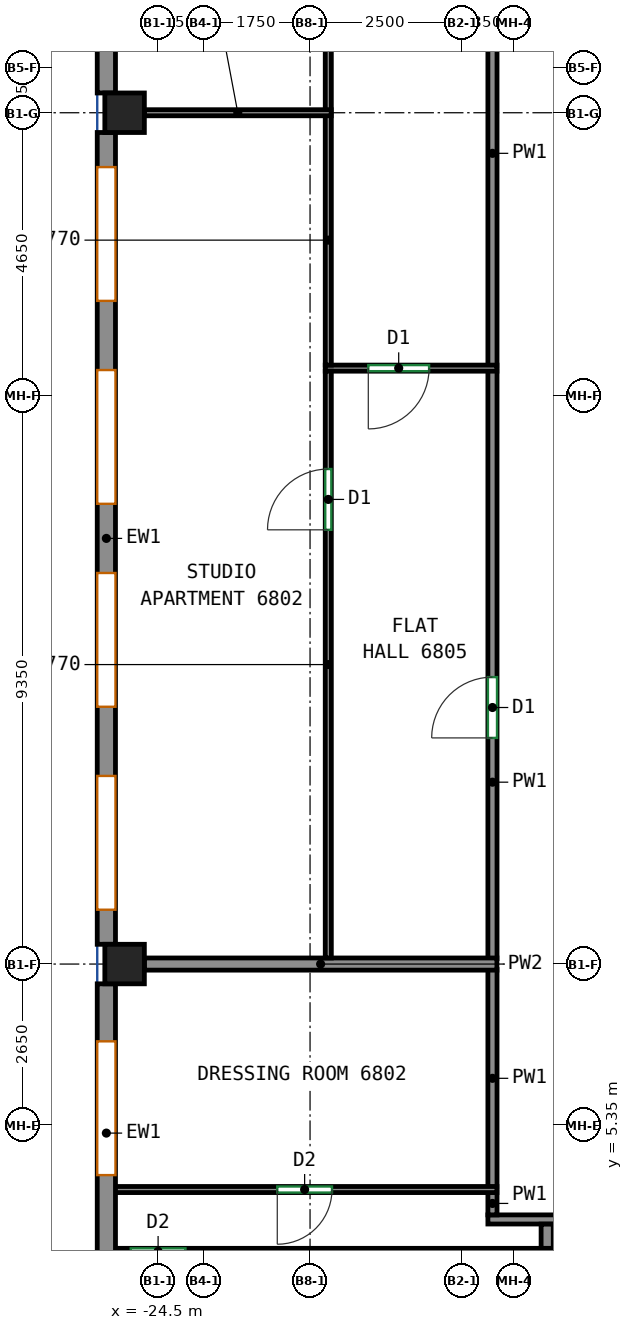
"""IFC4 building model, lengths in metres.
Left out: names, types, materials, properties, quantities, classifications, styles, units other than length and angle.
Written with IfcOpenShell. Run it as: python <this file> out.ifc"""

import sys

from ifc_helpers import new_model, si_unit, direction, frame, frame_2d, origin, origin_2d, place, context, subcontext, project, spatial, rectangle, extrude, source, transform, mapped, element, fill, save


model = new_model("IFC4")
c1 = context("Model", 3, precision=1e-05, world=origin(), true_north=direction((0.0, 1.0)))
c2 = subcontext(c1, "Body", "Model", "MODEL_VIEW")
j1 = project(units=[si_unit("LENGTHUNIT", "METRE"), si_unit("PLANEANGLEUNIT", "RADIAN")], contexts=[c1])
p1 = place(None, origin())
s1 = spatial("IfcSite", under=j1, at=p1, CompositionType="ELEMENT")
p2 = place(p1, origin())
s2 = spatial("IfcBuilding", under=s1, at=p2, CompositionType="ELEMENT")
p3 = place(p2, frame((0.0, 0.0, 277.2)))
s3 = spatial("IfcBuildingStorey", under=s2, at=p3, CompositionType="ELEMENT", Elevation=277.2)
m1 = source(origin(), c2, "Body", "SweptSolid", [
    extrude(rectangle(XDim=0.65, YDim=0.65, at=origin_2d()), origin(), (0.0, 0.0, 1.0), 3.12),
])
for number, where, z_axis, x_axis in (
    (1, (-25.05, 8.0, 0.0), (0.0, 0.0, 1.0), (1.0, 0.0, 0.0)),
    (2, (-25.05, 22.0, 0.0), (0.0, 0.0, 1.0), (1.0, 0.0, 0.0)),
):
    element("IfcColumn", number, at=place(p3, frame(where, z_axis=z_axis, x_axis=x_axis)), inside=s3, PredefinedType="COLUMN", context=c2, shape_type="MappedRepresentation", body=[
        mapped(m1, transform((0.0, 0.0, 0.0))),
    ])
m2 = source(origin(), c2, "Body", "SweptSolid", [
    extrude(rectangle(XDim=4.032, YDim=0.3, at=frame_2d((2.016, 0.0))), origin(), (0.0, 0.0, 1.0), 3.12),
])
p4 = place(p3, frame((-25.35, 26.357, 0.0), z_axis=(0.0, 0.0, 1.0), x_axis=(0.0, -1.0, 0.0)))
e3 = element("IfcWall", 3, at=p4, inside=s3, PredefinedType="SOLIDWALL", context=c2, shape_type="MappedRepresentation", body=[
    mapped(m2, transform((0.0, 0.0, 0.0))),
])
p5 = place(p4, frame((0.916, 0.0, 0.8)))
e4 = element("IfcOpeningElement", 4, at=p5, cuts=e3, PredefinedType="OPENING", context=c2, shape_type="SweptSolid", body=[
    extrude(rectangle(XDim=2.2, YDim=2.05, at=frame_2d((1.1, 1.025))), frame((0.0, 0.16, 0.0), z_axis=(0.0, -1.0, 0.0), x_axis=(1.0, 0.0, 0.0)), (0.0, 0.0, 1.0), 0.32),
])
m3 = source(origin(), c2, "Body", "SweptSolid", [
    extrude(rectangle(XDim=13.35, YDim=0.3, at=frame_2d((6.675, 0.0))), origin(), (0.0, 0.0, 1.0), 3.12),
])
p6 = place(p3, frame((-25.35, 21.675, 0.0), z_axis=(0.0, 0.0, 1.0), x_axis=(0.0, -1.0, 0.0)))
e5 = element("IfcWall", 5, at=p6, inside=s3, PredefinedType="SOLIDWALL", context=c2, shape_type="MappedRepresentation", body=[
    mapped(m3, transform((0.0, 0.0, 0.0))),
])
p7 = place(p6, frame((0.569, 0.0, 0.8)))
e6 = element("IfcOpeningElement", 6, at=p7, cuts=e5, PredefinedType="OPENING", context=c2, shape_type="SweptSolid", body=[
    extrude(rectangle(XDim=2.2, YDim=2.05, at=frame_2d((1.1, 1.025))), frame((0.0, 0.16, 0.0), z_axis=(0.0, -1.0, 0.0), x_axis=(1.0, 0.0, 0.0)), (0.0, 0.0, 1.0), 0.32),
])
p8 = place(p6, frame((3.906, 0.0, 0.8)))
e7 = element("IfcOpeningElement", 7, at=p8, cuts=e5, PredefinedType="OPENING", context=c2, shape_type="SweptSolid", body=[
    extrude(rectangle(XDim=2.2, YDim=2.05, at=frame_2d((1.1, 1.025))), frame((0.0, 0.16, 0.0), z_axis=(0.0, -1.0, 0.0), x_axis=(1.0, 0.0, 0.0)), (0.0, 0.0, 1.0), 0.32),
])
p9 = place(p6, frame((7.244, 0.0, 0.8)))
e8 = element("IfcOpeningElement", 8, at=p9, cuts=e5, PredefinedType="OPENING", context=c2, shape_type="SweptSolid", body=[
    extrude(rectangle(XDim=2.2, YDim=2.05, at=frame_2d((1.1, 1.025))), frame((0.0, 0.16, 0.0), z_axis=(0.0, -1.0, 0.0), x_axis=(1.0, 0.0, 0.0)), (0.0, 0.0, 1.0), 0.32),
])
p10 = place(p6, frame((10.581, 0.0, 0.8)))
e9 = element("IfcOpeningElement", 9, at=p10, cuts=e5, PredefinedType="OPENING", context=c2, shape_type="SweptSolid", body=[
    extrude(rectangle(XDim=2.2, YDim=2.05, at=frame_2d((1.1, 1.025))), frame((0.0, 0.16, 0.0), z_axis=(0.0, -1.0, 0.0), x_axis=(1.0, 0.0, 0.0)), (0.0, 0.0, 1.0), 0.32),
])
m4 = source(origin(), c2, "Body", "SweptSolid", [
    extrude(rectangle(XDim=8.183, YDim=0.3, at=frame_2d((4.092, 0.0))), origin(), (0.0, 0.0, 1.0), 3.12),
])
p11 = place(p3, frame((-25.35, 7.675, 0.0), z_axis=(0.0, 0.0, 1.0), x_axis=(0.0, -1.0, 0.0)))
e10 = element("IfcWall", 10, at=p11, inside=s3, PredefinedType="SOLIDWALL", context=c2, shape_type="MappedRepresentation", body=[
    mapped(m4, transform((0.0, 0.0, 0.0))),
])
p12 = place(p11, frame((0.946, 0.0, 0.8)))
e11 = element("IfcOpeningElement", 11, at=p12, cuts=e10, PredefinedType="OPENING", context=c2, shape_type="SweptSolid", body=[
    extrude(rectangle(XDim=2.2, YDim=2.05, at=frame_2d((1.1, 1.025))), frame((0.0, 0.16, 0.0), z_axis=(0.0, -1.0, 0.0), x_axis=(1.0, 0.0, 0.0)), (0.0, 0.0, 1.0), 0.32),
])
p13 = place(p11, frame((5.037, 0.0, 0.8)))
e12 = element("IfcOpeningElement", 12, at=p13, cuts=e10, PredefinedType="OPENING", context=c2, shape_type="SweptSolid", body=[
    extrude(rectangle(XDim=2.2, YDim=2.05, at=frame_2d((1.1, 1.025))), frame((0.0, 0.16, 0.0), z_axis=(0.0, -1.0, 0.0), x_axis=(1.0, 0.0, 0.0)), (0.0, 0.0, 1.0), 0.32),
])
p14 = place(p3, frame((-19.075, 3.8, 0.0), z_axis=(0.0, 0.0, 1.0), x_axis=(1.0, 0.0, 0.0)))
e13 = element("IfcWall", 13, at=p14, inside=s3, PredefinedType="PARTITIONING", context=c2, shape_type="SweptSolid", body=[
    extrude(rectangle(XDim=4.89, YDim=0.15, at=frame_2d((2.445, 0.0))), origin(), (0.0, 0.0, 1.0), 3.12),
])
p15 = place(p3, frame((-19.0, 3.875, 0.0), z_axis=(0.0, 0.0, 1.0), x_axis=(0.0, 1.0, 0.0)))
e14 = element("IfcWall", 14, at=p15, inside=s3, PredefinedType="PARTITIONING", context=c2, shape_type="SweptSolid", body=[
    extrude(rectangle(XDim=0.377, YDim=0.15, at=frame_2d((0.188, 0.0))), origin(), (0.0, 0.0, 1.0), 3.12),
])
p16 = place(p3, frame((-19.0, 4.332, 0.0), z_axis=(0.0, 0.0, 1.0), x_axis=(0.0, 1.0, 0.0)))
e15 = element("IfcWall", 15, at=p16, inside=s3, PredefinedType="PARTITIONING", context=c2, shape_type="SweptSolid", body=[
    extrude(rectangle(XDim=3.578, YDim=0.15, at=frame_2d((1.789, 0.0))), origin(), (0.0, 0.0, 1.0), 3.12),
])
p17 = place(p3, frame((-19.0, 8.09, 0.0), z_axis=(0.0, 0.0, 1.0), x_axis=(0.0, 1.0, 0.0)))
e16 = element("IfcWall", 16, at=p17, inside=s3, PredefinedType="PARTITIONING", context=c2, shape_type="SweptSolid", body=[
    extrude(rectangle(XDim=9.67, YDim=0.15, at=frame_2d((4.835, 0.0))), origin(), (0.0, 0.0, 1.0), 3.12),
])
p18 = place(p17, frame((3.629, 0.0, 0.0)))
e17 = element("IfcOpeningElement", 17, at=p18, cuts=e16, PredefinedType="OPENING", context=c2, shape_type="SweptSolid", body=[
    extrude(rectangle(XDim=1.0, YDim=2.1, at=frame_2d((0.5, 1.05))), frame((0.0, 0.085, 0.0), z_axis=(0.0, -1.0, 0.0), x_axis=(1.0, 0.0, 0.0)), (0.0, 0.0, 1.0), 0.17),
])
p19 = place(p3, frame((-19.0, 17.84, 0.0), z_axis=(0.0, 0.0, 1.0), x_axis=(0.0, 1.0, 0.0)))
e18 = element("IfcWall", 18, at=p19, inside=s3, PredefinedType="PARTITIONING", context=c2, shape_type="SweptSolid", body=[
    extrude(rectangle(XDim=6.985, YDim=0.15, at=frame_2d((3.492, 0.0))), origin(), (0.0, 0.0, 1.0), 3.12),
])
p20 = place(p3, frame((-18.0, 3.275, 0.0), z_axis=(0.0, 0.0, 1.0), x_axis=(-1.0, 0.0, 0.0)))
e19 = element("IfcWall", 19, at=p20, inside=s3, PredefinedType="PARTITIONING", context=c2, shape_type="SweptSolid", body=[
    extrude(rectangle(XDim=7.25, YDim=0.1, at=frame_2d((3.625, 0.0))), origin(), (0.0, 0.0, 1.0), 3.12),
])
p21 = place(p20, frame((6.049, 0.0, 0.0)))
e20 = element("IfcOpeningElement", 20, at=p21, cuts=e19, PredefinedType="OPENING", context=c2, shape_type="SweptSolid", body=[
    extrude(rectangle(XDim=0.9, YDim=2.1, at=frame_2d((0.45, 1.05))), frame((0.0, 0.06, 0.0), z_axis=(0.0, -1.0, 0.0), x_axis=(1.0, 0.0, 0.0)), (0.0, 0.0, 1.0), 0.12),
])
p22 = place(p3, frame((-18.927, 4.292, 0.0), z_axis=(0.0, 0.0, 1.0), x_axis=(-1.0, 0.0, 0.0)))
e21 = element("IfcWall", 21, at=p22, inside=s3, PredefinedType="PARTITIONING", context=c2, shape_type="SweptSolid", body=[
    extrude(rectangle(XDim=6.323, YDim=0.1, at=frame_2d((3.162, 0.0))), origin(), (0.0, 0.0, 1.0), 3.12),
])
p23 = place(p22, frame((2.712, 0.0, 0.0)))
e22 = element("IfcOpeningElement", 22, at=p23, cuts=e21, PredefinedType="OPENING", context=c2, shape_type="SweptSolid", body=[
    extrude(rectangle(XDim=0.9, YDim=2.1, at=frame_2d((0.45, 1.05))), frame((0.0, 0.06, 0.0), z_axis=(0.0, -1.0, 0.0), x_axis=(1.0, 0.0, 0.0)), (0.0, 0.0, 1.0), 0.12),
])
p24 = place(p3, frame((-18.1, 3.325, 0.0), z_axis=(0.0, 0.0, 1.0), x_axis=(0.0, 1.0, 0.0)))
e23 = element("IfcWall", 23, at=p24, inside=s3, PredefinedType="PARTITIONING", context=c2, shape_type="SweptSolid", body=[
    extrude(rectangle(XDim=0.398, YDim=0.2, at=frame_2d((0.199, 0.0))), origin(), (0.0, 0.0, 1.0), 3.12),
])
p25 = place(p3, frame((-24.725, 8.0, 0.0), z_axis=(0.0, 0.0, 1.0), x_axis=(1.0, 0.0, 0.0)))
e24 = element("IfcWall", 24, at=p25, inside=s3, PredefinedType="PARTITIONING", context=c2, shape_type="SweptSolid", body=[
    extrude(rectangle(XDim=5.798, YDim=0.2, at=frame_2d((2.899, 0.0))), origin(), (0.0, 0.0, 1.0), 2.57),
])
p26 = place(p3, frame((-18.927, 17.8, 0.0), z_axis=(0.0, 0.0, 1.0), x_axis=(-1.0, 0.0, 0.0)))
e25 = element("IfcWall", 25, at=p26, inside=s3, PredefinedType="PARTITIONING", context=c2, shape_type="SweptSolid", body=[
    extrude(rectangle(XDim=2.823, YDim=0.1, at=frame_2d((1.412, 0.0))), origin(), (0.0, 0.0, 1.0), 3.12),
])
p27 = place(p26, frame((1.115, 0.0, 0.0)))
e26 = element("IfcOpeningElement", 26, at=p27, cuts=e25, PredefinedType="OPENING", context=c2, shape_type="SweptSolid", body=[
    extrude(rectangle(XDim=1.0, YDim=2.1, at=frame_2d((0.5, 1.05))), frame((0.0, 0.06, 0.0), z_axis=(0.0, -1.0, 0.0), x_axis=(1.0, 0.0, 0.0)), (0.0, 0.0, 1.0), 0.12),
])
p28 = place(p3, frame((-21.7, 8.1, 0.0), z_axis=(0.0, 0.0, 1.0), x_axis=(0.0, 1.0, 0.0)))
e27 = element("IfcWall", 27, at=p28, inside=s3, PredefinedType="PARTITIONING", context=c2, shape_type="SweptSolid", body=[
    extrude(rectangle(XDim=9.65, YDim=0.1, at=frame_2d((4.825, 0.0))), origin(), (0.0, 0.0, 1.0), 2.57),
])
p29 = place(p28, frame((7.041, 0.0, 0.0)))
e28 = element("IfcOpeningElement", 28, at=p29, cuts=e27, PredefinedType="OPENING", context=c2, shape_type="SweptSolid", body=[
    extrude(rectangle(XDim=1.0, YDim=2.1, at=frame_2d((0.5, 1.05))), frame((0.0, 0.06, 0.0), z_axis=(0.0, -1.0, 0.0), x_axis=(1.0, 0.0, 0.0)), (0.0, 0.0, 1.0), 0.12),
])
p30 = place(p3, frame((-21.7, 17.85, 0.0), z_axis=(0.0, 0.0, 1.0), x_axis=(0.0, 1.0, 0.0)))
e29 = element("IfcWall", 29, at=p30, inside=s3, PredefinedType="PARTITIONING", context=c2, shape_type="SweptSolid", body=[
    extrude(rectangle(XDim=4.11, YDim=0.1, at=frame_2d((2.055, 0.0))), origin(), (0.0, 0.0, 1.0), 2.57),
])
p31 = place(p3, frame((-21.7, 22.04, 0.0), z_axis=(0.0, 0.0, 1.0), x_axis=(0.0, 1.0, 0.0)))
e30 = element("IfcWall", 30, at=p31, inside=s3, PredefinedType="PARTITIONING", context=c2, shape_type="SweptSolid", body=[
    extrude(rectangle(XDim=5.51, YDim=0.1, at=frame_2d((2.755, 0.0))), origin(), (0.0, 0.0, 1.0), 2.57),
])
p32 = place(p31, frame((3.809, 0.0, 0.0)))
e31 = element("IfcOpeningElement", 31, at=p32, cuts=e30, PredefinedType="OPENING", context=c2, shape_type="SweptSolid", body=[
    extrude(rectangle(XDim=0.9, YDim=2.1, at=frame_2d((0.45, 1.05))), frame((0.0, 0.06, 0.0), z_axis=(0.0, -1.0, 0.0), x_axis=(1.0, 0.0, 0.0)), (0.0, 0.0, 1.0), 0.12),
])
p33 = place(p3, frame((-21.652, 22.0, 0.0), z_axis=(0.0, 0.0, 1.0), x_axis=(-1.0, 0.0, 0.0)))
e32 = element("IfcWall", 32, at=p33, inside=s3, PredefinedType="PARTITIONING", context=c2, shape_type="SweptSolid", body=[
    extrude(rectangle(XDim=3.073, YDim=0.1, at=frame_2d((1.537, 0.0))), origin(), (0.0, 0.0, 1.0), 2.57),
])
p34 = place(p7, origin())
e33 = element("IfcWindow", 33, at=p34, inside=s3, PartitioningType="SINGLE_PANEL", PredefinedType="WINDOW", context=c2, shape_type="SweptSolid", body=[
    extrude(rectangle(XDim=2.2, YDim=2.05, at=frame_2d((1.1, 1.025))), frame((0.0, 0.03, 0.0), z_axis=(0.0, -1.0, 0.0), x_axis=(1.0, 0.0, 0.0)), (0.0, 0.0, 1.0), 0.06),
])
fill(e6, e33)
p35 = place(p8, origin())
e34 = element("IfcWindow", 34, at=p35, inside=s3, PartitioningType="SINGLE_PANEL", PredefinedType="WINDOW", context=c2, shape_type="SweptSolid", body=[
    extrude(rectangle(XDim=2.2, YDim=2.05, at=frame_2d((1.1, 1.025))), frame((0.0, 0.03, 0.0), z_axis=(0.0, -1.0, 0.0), x_axis=(1.0, 0.0, 0.0)), (0.0, 0.0, 1.0), 0.06),
])
fill(e7, e34)
p36 = place(p9, origin())
e35 = element("IfcWindow", 35, at=p36, inside=s3, PartitioningType="SINGLE_PANEL", PredefinedType="WINDOW", context=c2, shape_type="SweptSolid", body=[
    extrude(rectangle(XDim=2.2, YDim=2.05, at=frame_2d((1.1, 1.025))), frame((0.0, 0.03, 0.0), z_axis=(0.0, -1.0, 0.0), x_axis=(1.0, 0.0, 0.0)), (0.0, 0.0, 1.0), 0.06),
])
fill(e8, e35)
p37 = place(p10, origin())
e36 = element("IfcWindow", 36, at=p37, inside=s3, PartitioningType="SINGLE_PANEL", PredefinedType="WINDOW", context=c2, shape_type="SweptSolid", body=[
    extrude(rectangle(XDim=2.2, YDim=2.05, at=frame_2d((1.1, 1.025))), frame((0.0, 0.03, 0.0), z_axis=(0.0, -1.0, 0.0), x_axis=(1.0, 0.0, 0.0)), (0.0, 0.0, 1.0), 0.06),
])
fill(e9, e36)
p38 = place(p12, origin())
e37 = element("IfcWindow", 37, at=p38, inside=s3, PartitioningType="SINGLE_PANEL", PredefinedType="WINDOW", context=c2, shape_type="SweptSolid", body=[
    extrude(rectangle(XDim=2.2, YDim=2.05, at=frame_2d((1.1, 1.025))), frame((0.0, 0.03, 0.0), z_axis=(0.0, -1.0, 0.0), x_axis=(1.0, 0.0, 0.0)), (0.0, 0.0, 1.0), 0.06),
])
fill(e11, e37)
p39 = place(p21, origin())
e38 = element("IfcDoor", 38, at=p39, inside=s3, OperationType="SINGLE_SWING_LEFT", PredefinedType="DOOR", context=c2, shape_type="SweptSolid", body=[
    extrude(rectangle(XDim=0.9, YDim=2.1, at=frame_2d((0.45, 1.05))), frame((0.0, 0.025, 0.0), z_axis=(0.0, -1.0, 0.0), x_axis=(1.0, 0.0, 0.0)), (0.0, 0.0, 1.0), 0.05),
])
fill(e20, e38)
p40 = place(p23, origin())
e39 = element("IfcDoor", 39, at=p40, inside=s3, OperationType="SINGLE_SWING_RIGHT", PredefinedType="DOOR", context=c2, shape_type="SweptSolid", body=[
    extrude(rectangle(XDim=0.9, YDim=2.1, at=frame_2d((0.45, 1.05))), frame((0.0, 0.025, 0.0), z_axis=(0.0, -1.0, 0.0), x_axis=(1.0, 0.0, 0.0)), (0.0, 0.0, 1.0), 0.05),
])
fill(e22, e39)
p41 = place(p18, origin())
e40 = element("IfcDoor", 40, at=p41, inside=s3, OperationType="SINGLE_SWING_LEFT", PredefinedType="DOOR", context=c2, shape_type="SweptSolid", body=[
    extrude(rectangle(XDim=1.0, YDim=2.1, at=frame_2d((0.5, 1.05))), frame((0.0, 0.025, 0.0), z_axis=(0.0, -1.0, 0.0), x_axis=(1.0, 0.0, 0.0)), (0.0, 0.0, 1.0), 0.05),
])
fill(e17, e40)
p42 = place(p29, origin())
e41 = element("IfcDoor", 41, at=p42, inside=s3, OperationType="SINGLE_SWING_LEFT", PredefinedType="DOOR", context=c2, shape_type="SweptSolid", body=[
    extrude(rectangle(XDim=1.0, YDim=2.1, at=frame_2d((0.5, 1.05))), frame((0.0, 0.025, 0.0), z_axis=(0.0, -1.0, 0.0), x_axis=(1.0, 0.0, 0.0)), (0.0, 0.0, 1.0), 0.05),
])
fill(e28, e41)
p43 = place(p27, origin())
e42 = element("IfcDoor", 42, at=p43, inside=s3, OperationType="SINGLE_SWING_RIGHT", PredefinedType="DOOR", context=c2, shape_type="SweptSolid", body=[
    extrude(rectangle(XDim=1.0, YDim=2.1, at=frame_2d((0.5, 1.05))), frame((0.0, 0.025, 0.0), z_axis=(0.0, -1.0, 0.0), x_axis=(1.0, 0.0, 0.0)), (0.0, 0.0, 1.0), 0.05),
])
fill(e26, e42)
save(model, sys.argv[1])
